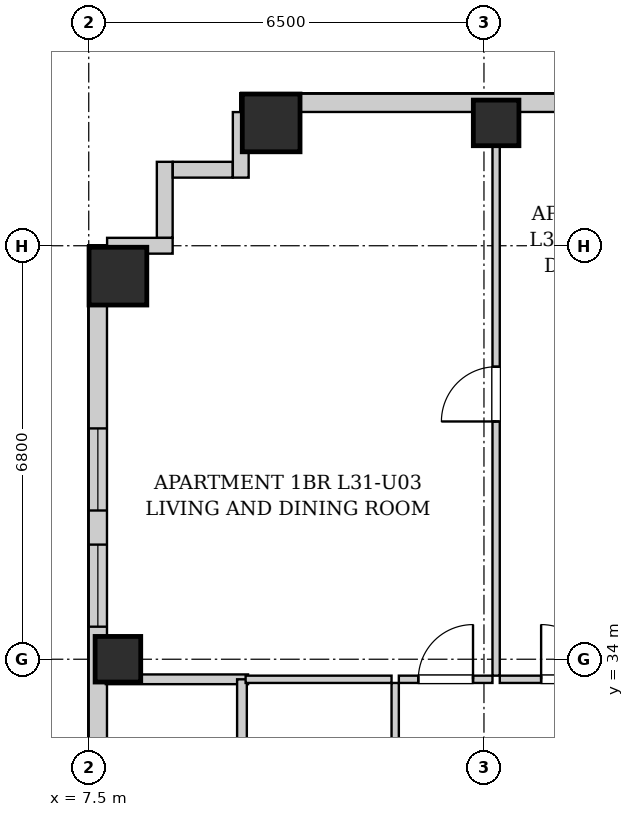
"""IFC4 building model, lengths in metres.
Left out: names, types, materials, properties, quantities, classifications, styles, units other than length and angle.
Written with IfcOpenShell. Run it as: python <this file> out.ifc"""

import sys

from ifc_helpers import new_model, si_unit, direction, frame, frame_2d, origin, origin_2d, place, context, subcontext, project, spatial, rectangle, extrude, element, fill, save


model = new_model("IFC4")
c1 = context("Model", 3, precision=1e-05, world=origin(), true_north=direction((0.0, 1.0)))
c2 = subcontext(c1, "Body", "Model", "MODEL_VIEW")
j1 = project(units=[si_unit("LENGTHUNIT", "METRE"), si_unit("PLANEANGLEUNIT", "RADIAN")], contexts=[c1])
p1 = place(None, origin())
s1 = spatial("IfcSite", under=j1, at=p1, CompositionType="ELEMENT")
p2 = place(p1, origin())
s2 = spatial("IfcBuilding", under=s1, at=p2, CompositionType="ELEMENT")
p3 = place(p2, frame((0.0, 0.0, 110.3)))
s3 = spatial("IfcBuildingStorey", under=s2, at=p3, CompositionType="ELEMENT", Elevation=110.3)
p4 = place(p3, frame((10.5, 42.82, 0.0), z_axis=(0.0, 0.0, 1.0), x_axis=(1.0, 0.0, 0.0)))
e1 = element("IfcColumn", 1, at=p4, inside=s3, PredefinedType="COLUMN", context=c2, shape_type="SweptSolid", body=[
    extrude(rectangle(XDim=0.95, YDim=0.95, at=origin_2d()), origin(), (0.0, 0.0, 1.0), 3.2),
])
for number, where, z_axis, x_axis in (
    (2, (14.2, 42.82, 0.0), (0.0, 0.0, 1.0), (1.0, 0.0, 0.0)),
    (3, (7.98, 34.0, 0.0), (0.0, 0.0, 1.0), (1.0, 0.0, 0.0)),
):
    element("IfcColumn", number, at=place(p3, frame(where, z_axis=z_axis, x_axis=x_axis)), inside=s3, PredefinedType="COLUMN", context=c2, shape_type="SweptSolid", body=[
        extrude(rectangle(XDim=0.75, YDim=0.75, at=origin_2d()), origin(), (0.0, 0.0, 1.0), 3.2),
    ])
p5 = place(p3, frame((7.98, 40.3, 0.0), z_axis=(0.0, 0.0, 1.0), x_axis=(1.0, 0.0, 0.0)))
e4 = element("IfcColumn", 4, at=p5, inside=s3, PredefinedType="COLUMN", context=c2, shape_type="SweptSolid", body=[
    extrude(rectangle(XDim=0.95, YDim=0.95, at=origin_2d()), origin(), (0.0, 0.0, 1.0), 3.2),
])
p6 = place(p3, frame((10.0, 43.15, 0.0), z_axis=(0.0, 0.0, 1.0), x_axis=(1.0, 0.0, 0.0)))
e5 = element("IfcWall", 5, at=p6, inside=s3, PredefinedType="SOLIDWALL", context=c2, shape_type="SweptSolid", body=[
    extrude(rectangle(XDim=21.95, YDim=0.3, at=frame_2d((10.975, 0.0))), origin(), (0.0, 0.0, 1.0), 2.94),
])
p7 = place(p6, frame((5.489, 0.0, 0.55)))
e6 = element("IfcOpeningElement", 6, at=p7, cuts=e5, PredefinedType="OPENING", context=c2, shape_type="SweptSolid", body=[
    extrude(rectangle(XDim=1.35, YDim=1.2, at=frame_2d((0.675, 0.6))), frame((0.0, 0.16, 0.0), z_axis=(0.0, -1.0, 0.0), x_axis=(1.0, 0.0, 0.0)), (0.0, 0.0, 1.0), 0.32),
])
p8 = place(p6, frame((9.322, 0.0, 0.55)))
e7 = element("IfcOpeningElement", 7, at=p8, cuts=e5, PredefinedType="OPENING", context=c2, shape_type="SweptSolid", body=[
    extrude(rectangle(XDim=1.35, YDim=1.2, at=frame_2d((0.675, 0.6))), frame((0.0, 0.16, 0.0), z_axis=(0.0, -1.0, 0.0), x_axis=(1.0, 0.0, 0.0)), (0.0, 0.0, 1.0), 0.32),
])
p9 = place(p6, frame((18.869, 0.0, 0.55)))
e8 = element("IfcOpeningElement", 8, at=p9, cuts=e5, PredefinedType="OPENING", context=c2, shape_type="SweptSolid", body=[
    extrude(rectangle(XDim=1.35, YDim=1.2, at=frame_2d((0.675, 0.6))), frame((0.0, 0.16, 0.0), z_axis=(0.0, -1.0, 0.0), x_axis=(1.0, 0.0, 0.0)), (0.0, 0.0, 1.0), 0.32),
])
p10 = place(p3, frame((7.65, 2.5, 0.0), z_axis=(0.0, 0.0, 1.0), x_axis=(0.0, 1.0, 0.0)))
e9 = element("IfcWall", 9, at=p10, inside=s3, PredefinedType="SOLIDWALL", context=c2, shape_type="SweptSolid", body=[
    extrude(rectangle(XDim=38.3, YDim=0.3, at=frame_2d((19.15, 0.0))), origin(), (0.0, 0.0, 1.0), 2.94),
])
p11 = place(p10, frame((3.38, 0.0, 0.55)))
e10 = element("IfcOpeningElement", 10, at=p11, cuts=e9, PredefinedType="OPENING", context=c2, shape_type="SweptSolid", body=[
    extrude(rectangle(XDim=1.35, YDim=1.2, at=frame_2d((0.675, 0.6))), frame((0.0, 0.16, 0.0), z_axis=(0.0, -1.0, 0.0), x_axis=(1.0, 0.0, 0.0)), (0.0, 0.0, 1.0), 0.32),
])
p12 = place(p10, frame((1.135, 0.0, 0.55)))
e11 = element("IfcOpeningElement", 11, at=p12, cuts=e9, PredefinedType="OPENING", context=c2, shape_type="SweptSolid", body=[
    extrude(rectangle(XDim=1.35, YDim=1.2, at=frame_2d((0.675, 0.6))), frame((0.0, 0.16, 0.0), z_axis=(0.0, -1.0, 0.0), x_axis=(1.0, 0.0, 0.0)), (0.0, 0.0, 1.0), 0.32),
])
p13 = place(p10, frame((33.946, 0.0, 0.55)))
e12 = element("IfcOpeningElement", 12, at=p13, cuts=e9, PredefinedType="OPENING", context=c2, shape_type="SweptSolid", body=[
    extrude(rectangle(XDim=1.35, YDim=1.2, at=frame_2d((0.675, 0.6))), frame((0.0, 0.16, 0.0), z_axis=(0.0, -1.0, 0.0), x_axis=(1.0, 0.0, 0.0)), (0.0, 0.0, 1.0), 0.32),
])
p14 = place(p10, frame((32.035, 0.0, 0.55)))
e13 = element("IfcOpeningElement", 13, at=p14, cuts=e9, PredefinedType="OPENING", context=c2, shape_type="SweptSolid", body=[
    extrude(rectangle(XDim=1.35, YDim=1.2, at=frame_2d((0.675, 0.6))), frame((0.0, 0.16, 0.0), z_axis=(0.0, -1.0, 0.0), x_axis=(1.0, 0.0, 0.0)), (0.0, 0.0, 1.0), 0.32),
])
p15 = place(p10, frame((15.65, 0.0, 0.55)))
e14 = element("IfcOpeningElement", 14, at=p15, cuts=e9, PredefinedType="OPENING", context=c2, shape_type="SweptSolid", body=[
    extrude(rectangle(XDim=1.35, YDim=1.2, at=frame_2d((0.675, 0.6))), frame((0.0, 0.16, 0.0), z_axis=(0.0, -1.0, 0.0), x_axis=(1.0, 0.0, 0.0)), (0.0, 0.0, 1.0), 0.32),
])
p16 = place(p10, frame((13.035, 0.0, 0.55)))
e15 = element("IfcOpeningElement", 15, at=p16, cuts=e9, PredefinedType="OPENING", context=c2, shape_type="SweptSolid", body=[
    extrude(rectangle(XDim=1.35, YDim=1.2, at=frame_2d((0.675, 0.6))), frame((0.0, 0.16, 0.0), z_axis=(0.0, -1.0, 0.0), x_axis=(1.0, 0.0, 0.0)), (0.0, 0.0, 1.0), 0.32),
])
p17 = place(p10, frame((22.831, 0.0, 0.55)))
e16 = element("IfcOpeningElement", 16, at=p17, cuts=e9, PredefinedType="OPENING", context=c2, shape_type="SweptSolid", body=[
    extrude(rectangle(XDim=1.35, YDim=1.2, at=frame_2d((0.675, 0.6))), frame((0.0, 0.16, 0.0), z_axis=(0.0, -1.0, 0.0), x_axis=(1.0, 0.0, 0.0)), (0.0, 0.0, 1.0), 0.32),
])
p18 = place(p10, frame((24.441, 0.0, 0.55)))
e17 = element("IfcOpeningElement", 17, at=p18, cuts=e9, PredefinedType="OPENING", context=c2, shape_type="SweptSolid", body=[
    extrude(rectangle(XDim=1.35, YDim=1.2, at=frame_2d((0.675, 0.6))), frame((0.0, 0.16, 0.0), z_axis=(0.0, -1.0, 0.0), x_axis=(1.0, 0.0, 0.0)), (0.0, 0.0, 1.0), 0.32),
])
p19 = place(p3, frame((7.802, 40.8, 0.0), z_axis=(0.0, 0.0, 1.0), x_axis=(1.0, 0.0, 0.0)))
e18 = element("IfcWall", 18, at=p19, inside=s3, PredefinedType="SOLIDWALL", context=c2, shape_type="SweptSolid", body=[
    extrude(rectangle(XDim=1.078, YDim=0.26, at=frame_2d((0.539, 0.0))), origin(), (0.0, 0.0, 1.0), 2.94),
])
p20 = place(p3, frame((8.75, 40.932, 0.0), z_axis=(0.0, 0.0, 1.0), x_axis=(0.0, 1.0, 0.0)))
e19 = element("IfcWall", 19, at=p20, inside=s3, PredefinedType="SOLIDWALL", context=c2, shape_type="SweptSolid", body=[
    extrude(rectangle(XDim=1.248, YDim=0.26, at=frame_2d((0.624, 0.0))), origin(), (0.0, 0.0, 1.0), 2.94),
])
p21 = place(p3, frame((8.882, 42.05, 0.0), z_axis=(0.0, 0.0, 1.0), x_axis=(1.0, 0.0, 0.0)))
e20 = element("IfcWall", 20, at=p21, inside=s3, PredefinedType="SOLIDWALL", context=c2, shape_type="SweptSolid", body=[
    extrude(rectangle(XDim=0.986, YDim=0.26, at=frame_2d((0.493, 0.0))), origin(), (0.0, 0.0, 1.0), 2.94),
])
p22 = place(p3, frame((10.0, 41.92, 0.0), z_axis=(0.0, 0.0, 1.0), x_axis=(0.0, 1.0, 0.0)))
e21 = element("IfcWall", 21, at=p22, inside=s3, PredefinedType="SOLIDWALL", context=c2, shape_type="SweptSolid", body=[
    extrude(rectangle(XDim=1.078, YDim=0.26, at=frame_2d((0.539, 0.0))), origin(), (0.0, 0.0, 1.0), 2.94),
])
p23 = place(p3, frame((7.78, 33.67, 0.0), z_axis=(0.0, 0.0, 1.0), x_axis=(1.0, 0.0, 0.0)))
e22 = element("IfcWall", 22, at=p23, inside=s3, PredefinedType="PARTITIONING", context=c2, shape_type="SweptSolid", body=[
    extrude(rectangle(XDim=2.34, YDim=0.16, at=frame_2d((1.17, 0.0))), origin(), (0.0, 0.0, 1.0), 2.94),
])
p24 = place(p3, frame((10.02, 30.76, 0.0), z_axis=(0.0, 0.0, 1.0), x_axis=(0.0, 1.0, 0.0)))
e23 = element("IfcWall", 23, at=p24, inside=s3, PredefinedType="PARTITIONING", context=c2, shape_type="SweptSolid", body=[
    extrude(rectangle(XDim=2.91, YDim=0.16, at=frame_2d((1.455, 0.0))), origin(), (0.0, 0.0, 1.0), 2.94),
])
p25 = place(p3, frame((12.54, 30.76, 0.0), z_axis=(0.0, 0.0, 1.0), x_axis=(0.0, 1.0, 0.0)))
e24 = element("IfcWall", 24, at=p25, inside=s3, PredefinedType="PARTITIONING", context=c2, shape_type="SweptSolid", body=[
    extrude(rectangle(XDim=2.85, YDim=0.12, at=frame_2d((1.425, 0.0))), origin(), (0.0, 0.0, 1.0), 2.94),
])
p26 = place(p25, frame((0.995, 0.0, 0.0)))
e25 = element("IfcOpeningElement", 25, at=p26, cuts=e24, PredefinedType="OPENING", context=c2, shape_type="SweptSolid", body=[
    extrude(rectangle(XDim=0.86, YDim=2.05, at=frame_2d((0.43, 1.025))), frame((0.0, 0.07, 0.0), z_axis=(0.0, -1.0, 0.0), x_axis=(1.0, 0.0, 0.0)), (0.0, 0.0, 1.0), 0.14),
])
p27 = place(p3, frame((10.08, 33.67, 0.0), z_axis=(0.0, 0.0, 1.0), x_axis=(1.0, 0.0, 0.0)))
e26 = element("IfcWall", 26, at=p27, inside=s3, PredefinedType="PARTITIONING", context=c2, shape_type="SweptSolid", body=[
    extrude(rectangle(XDim=2.4, YDim=0.12, at=frame_2d((1.2, 0.0))), origin(), (0.0, 0.0, 1.0), 2.94),
])
p28 = place(p3, frame((12.6, 33.67, 0.0), z_axis=(0.0, 0.0, 1.0), x_axis=(1.0, 0.0, 0.0)))
e27 = element("IfcWall", 27, at=p28, inside=s3, PredefinedType="PARTITIONING", context=c2, shape_type="SweptSolid", body=[
    extrude(rectangle(XDim=1.54, YDim=0.12, at=frame_2d((0.77, 0.0))), origin(), (0.0, 0.0, 1.0), 2.94),
])
p29 = place(p28, frame((0.32, 0.0, 0.0)))
e28 = element("IfcOpeningElement", 28, at=p29, cuts=e27, PredefinedType="OPENING", context=c2, shape_type="SweptSolid", body=[
    extrude(rectangle(XDim=0.9, YDim=2.05, at=frame_2d((0.45, 1.025))), frame((0.0, 0.07, 0.0), z_axis=(0.0, -1.0, 0.0), x_axis=(1.0, 0.0, 0.0)), (0.0, 0.0, 1.0), 0.14),
])
p30 = place(p3, frame((14.26, 33.67, 0.0), z_axis=(0.0, 0.0, 1.0), x_axis=(1.0, 0.0, 0.0)))
e29 = element("IfcWall", 29, at=p30, inside=s3, PredefinedType="PARTITIONING", context=c2, shape_type="SweptSolid", body=[
    extrude(rectangle(XDim=2.26, YDim=0.12, at=frame_2d((1.13, 0.0))), origin(), (0.0, 0.0, 1.0), 2.94),
])
p31 = place(p30, frame((0.68, 0.0, 0.0)))
e30 = element("IfcOpeningElement", 30, at=p31, cuts=e29, PredefinedType="OPENING", context=c2, shape_type="SweptSolid", body=[
    extrude(rectangle(XDim=0.9, YDim=2.05, at=frame_2d((0.45, 1.025))), frame((0.0, 0.07, 0.0), z_axis=(0.0, -1.0, 0.0), x_axis=(1.0, 0.0, 0.0)), (0.0, 0.0, 1.0), 0.14),
])
p32 = place(p3, frame((14.2, 33.73, 0.0), z_axis=(0.0, 0.0, 1.0), x_axis=(0.0, 1.0, 0.0)))
e31 = element("IfcWall", 31, at=p32, inside=s3, PredefinedType="PARTITIONING", context=c2, shape_type="SweptSolid", body=[
    extrude(rectangle(XDim=9.29, YDim=0.12, at=frame_2d((4.645, 0.0))), origin(), (0.0, 0.0, 1.0), 2.94),
])
p33 = place(p32, frame((4.18, 0.0, 0.0)))
e32 = element("IfcOpeningElement", 32, at=p33, cuts=e31, PredefinedType="OPENING", context=c2, shape_type="SweptSolid", body=[
    extrude(rectangle(XDim=0.9, YDim=2.05, at=frame_2d((0.45, 1.025))), frame((0.0, 0.07, 0.0), z_axis=(0.0, -1.0, 0.0), x_axis=(1.0, 0.0, 0.0)), (0.0, 0.0, 1.0), 0.14),
])
p34 = place(p29, origin())
e33 = element("IfcDoor", 33, at=p34, inside=s3, OperationType="SINGLE_SWING_RIGHT", PredefinedType="DOOR", context=c2, shape_type="SweptSolid", body=[
    extrude(rectangle(XDim=0.9, YDim=2.05, at=frame_2d((0.45, 1.025))), frame((0.0, 0.025, 0.0), z_axis=(0.0, -1.0, 0.0), x_axis=(1.0, 0.0, 0.0)), (0.0, 0.0, 1.0), 0.05),
])
fill(e28, e33)
p35 = place(p31, origin())
e34 = element("IfcDoor", 34, at=p35, inside=s3, OperationType="SINGLE_SWING_LEFT", PredefinedType="DOOR", context=c2, shape_type="SweptSolid", body=[
    extrude(rectangle(XDim=0.9, YDim=2.05, at=frame_2d((0.45, 1.025))), frame((0.0, 0.025, 0.0), z_axis=(0.0, -1.0, 0.0), x_axis=(1.0, 0.0, 0.0)), (0.0, 0.0, 1.0), 0.05),
])
fill(e30, e34)
p36 = place(p33, origin())
e35 = element("IfcDoor", 35, at=p36, inside=s3, OperationType="SINGLE_SWING_LEFT", PredefinedType="DOOR", context=c2, shape_type="SweptSolid", body=[
    extrude(rectangle(XDim=0.9, YDim=2.05, at=frame_2d((0.45, 1.025))), frame((0.0, 0.025, 0.0), z_axis=(0.0, -1.0, 0.0), x_axis=(1.0, 0.0, 0.0)), (0.0, 0.0, 1.0), 0.05),
])
fill(e32, e35)
p37 = place(p13, origin())
e36 = element("IfcWindow", 36, at=p37, inside=s3, PartitioningType="SINGLE_PANEL", PredefinedType="WINDOW", context=c2, shape_type="SweptSolid", body=[
    extrude(rectangle(XDim=1.35, YDim=1.2, at=frame_2d((0.675, 0.6))), frame((0.0, 0.03, 0.0), z_axis=(0.0, -1.0, 0.0), x_axis=(1.0, 0.0, 0.0)), (0.0, 0.0, 1.0), 0.06),
])
fill(e12, e36)
p38 = place(p14, origin())
e37 = element("IfcWindow", 37, at=p38, inside=s3, PartitioningType="SINGLE_PANEL", PredefinedType="WINDOW", context=c2, shape_type="SweptSolid", body=[
    extrude(rectangle(XDim=1.35, YDim=1.2, at=frame_2d((0.675, 0.6))), frame((0.0, 0.03, 0.0), z_axis=(0.0, -1.0, 0.0), x_axis=(1.0, 0.0, 0.0)), (0.0, 0.0, 1.0), 0.06),
])
fill(e13, e37)
save(model, sys.argv[1])
